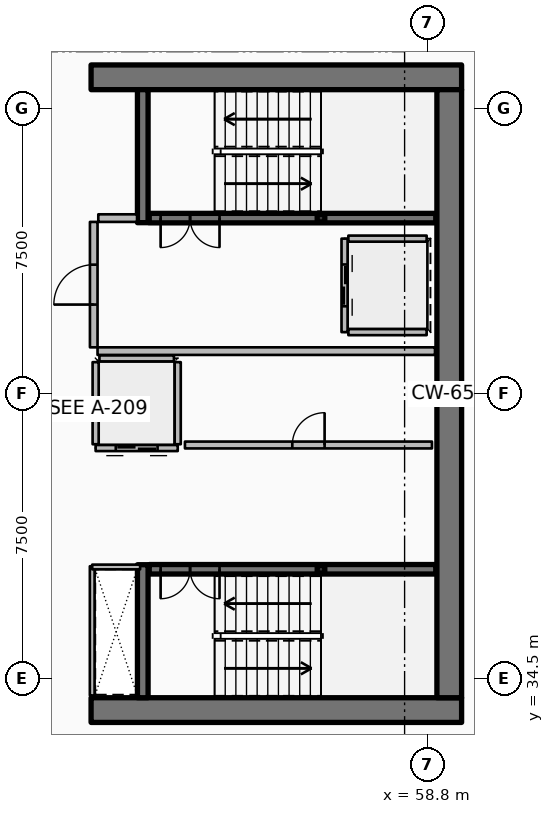
"""IFC4 building model, lengths in metres.
Left out: names, types, materials, properties, quantities, classifications, styles, units other than length and angle.
Written with IfcOpenShell. Run it as: python <this file> out.ifc"""

import sys

from ifc_helpers import new_model, si_unit, direction, frame, frame_2d, origin, origin_2d, place, context, subcontext, project, spatial, rectangle, hollow_rectangle, extrude, element, fill, save


model = new_model("IFC4")
c1 = context("Model", 3, precision=1e-05, world=origin(), true_north=direction((0.0, 1.0)))
c2 = subcontext(c1, "Body", "Model", "MODEL_VIEW")
j1 = project(units=[si_unit("LENGTHUNIT", "METRE"), si_unit("PLANEANGLEUNIT", "RADIAN")], contexts=[c1])
p1 = place(None, origin())
s1 = spatial("IfcSite", under=j1, at=p1, CompositionType="ELEMENT")
p2 = place(p1, origin())
s2 = spatial("IfcBuilding", under=s1, at=p2, CompositionType="ELEMENT")
p3 = place(p2, frame((0.0, 0.0, 217.8)))
s3 = spatial("IfcBuildingStorey", under=s2, at=p3, CompositionType="ELEMENT", Elevation=217.8)
for number, where, z_axis, x_axis in (
    (1, (49.95, 33.675, 0.0), (0.0, 0.0, 1.0), (1.0, 0.0, 0.0)),
    (2, (49.95, 50.325, 0.0), (0.0, 0.0, 1.0), (1.0, 0.0, 0.0)),
):
    element("IfcWall", number, at=place(p3, frame(where, z_axis=z_axis, x_axis=x_axis)), inside=s3, PredefinedType="SHEAR", context=c2, shape_type="SweptSolid", body=[
        extrude(rectangle(XDim=9.75, YDim=0.65, at=frame_2d((4.875, 0.0))), origin(), (0.0, 0.0, 1.0), 3.75),
    ])
p4 = place(p3, frame((59.375, 34.0, 0.0), z_axis=(0.0, 0.0, 1.0), x_axis=(0.0, 1.0, 0.0)))
e3 = element("IfcWall", 3, at=p4, inside=s3, PredefinedType="SHEAR", context=c2, shape_type="SweptSolid", body=[
    extrude(rectangle(XDim=16.0, YDim=0.65, at=frame_2d((8.0, 0.0))), origin(), (0.0, 0.0, 1.0), 3.75),
])
for number, where, z_axis, x_axis in (
    (4, (51.31, 46.5, 0.0), (0.0, 0.0, 1.0), (0.0, 1.0, 0.0)),
    (5, (51.31, 34.0, 0.0), (0.0, 0.0, 1.0), (0.0, 1.0, 0.0)),
):
    element("IfcWall", number, at=place(p3, frame(where, z_axis=z_axis, x_axis=x_axis)), inside=s3, PredefinedType="SHEAR", context=c2, shape_type="SweptSolid", body=[
        extrude(rectangle(XDim=3.5, YDim=0.28, at=frame_2d((1.75, 0.0))), origin(), (0.0, 0.0, 1.0), 3.75),
    ])
for number, where, z_axis, x_axis in (
    (6, (56.0, 46.62, 0.0), (0.0, 0.0, 1.0), (1.0, 0.0, 0.0)),
    (7, (56.0, 37.38, 0.0), (0.0, 0.0, 1.0), (1.0, 0.0, 0.0)),
):
    element("IfcColumn", number, at=place(p3, frame(where, z_axis=z_axis, x_axis=x_axis)), inside=s3, PredefinedType="COLUMN", context=c2, shape_type="SweptSolid", body=[
        extrude(hollow_rectangle(XDim=0.2, YDim=0.2, WallThickness=0.01, InnerFilletRadius=0.01, OuterFilletRadius=0.02, at=origin_2d()), origin(), (0.0, 0.0, 1.0), 1.67),
    ])
p5 = place(p3, frame((51.48, 46.62, 0.0), z_axis=(0.0, 0.0, 1.0), x_axis=(1.0, 0.0, 0.0)))
e8 = element("IfcWall", 8, at=p5, inside=s3, PredefinedType="SOLIDWALL", context=c2, shape_type="SweptSolid", body=[
    extrude(rectangle(XDim=7.54, YDim=0.25, at=frame_2d((3.77, 0.0))), origin(), (0.0, 0.0, 1.0), 3.5),
])
p6 = place(p5, frame((0.3, 0.0, 0.0)))
e9 = element("IfcOpeningElement", 9, at=p6, cuts=e8, PredefinedType="OPENING", context=c2, shape_type="SweptSolid", body=[
    extrude(rectangle(XDim=1.55, YDim=2.15, at=frame_2d((0.775, 1.075))), frame((0.0, 0.135, 0.0), z_axis=(0.0, -1.0, 0.0), x_axis=(1.0, 0.0, 0.0)), (0.0, 0.0, 1.0), 0.27),
])
p7 = place(p3, frame((51.48, 37.38, 0.0), z_axis=(0.0, 0.0, 1.0), x_axis=(1.0, 0.0, 0.0)))
e10 = element("IfcWall", 10, at=p7, inside=s3, PredefinedType="SOLIDWALL", context=c2, shape_type="SweptSolid", body=[
    extrude(rectangle(XDim=7.54, YDim=0.25, at=frame_2d((3.77, 0.0))), origin(), (0.0, 0.0, 1.0), 3.5),
])
p8 = place(p7, frame((0.3, 0.0, 0.0)))
e11 = element("IfcOpeningElement", 11, at=p8, cuts=e10, PredefinedType="OPENING", context=c2, shape_type="SweptSolid", body=[
    extrude(rectangle(XDim=1.55, YDim=2.15, at=frame_2d((0.775, 1.075))), frame((0.0, 0.135, 0.0), z_axis=(0.0, -1.0, 0.0), x_axis=(1.0, 0.0, 0.0)), (0.0, 0.0, 1.0), 0.27),
])
p9 = place(p3, frame((56.62, 46.08, 0.0), z_axis=(0.0, 0.0, 1.0), x_axis=(0.0, -1.0, 0.0)))
e12 = element("IfcWall", 12, at=p9, inside=s3, PredefinedType="PARTITIONING", context=c2, shape_type="SweptSolid", body=[
    extrude(rectangle(XDim=2.46, YDim=0.16, at=frame_2d((1.23, 0.0))), origin(), (0.0, 0.0, 1.0), 3.5),
])
p10 = place(p9, frame((0.68, 0.0, 0.0)))
e13 = element("IfcOpeningElement", 13, at=p10, cuts=e12, PredefinedType="OPENING", context=c2, shape_type="SweptSolid", body=[
    extrude(rectangle(XDim=1.1, YDim=2.1, at=frame_2d((0.55, 1.05))), frame((0.0, 0.09, 0.0), z_axis=(0.0, -1.0, 0.0), x_axis=(1.0, 0.0, 0.0)), (0.0, 0.0, 1.0), 0.18),
])
for number, where, z_axis, x_axis in (
    (14, (56.72, 46.08, 0.0), (0.0, 0.0, 1.0), (1.0, 0.0, 0.0)),
    (15, (56.72, 43.62, 0.0), (0.0, 0.0, 1.0), (1.0, 0.0, 0.0)),
):
    element("IfcWall", number, at=place(p3, frame(where, z_axis=z_axis, x_axis=x_axis)), inside=s3, PredefinedType="PARTITIONING", context=c2, shape_type="SweptSolid", body=[
        extrude(rectangle(XDim=2.06, YDim=0.16, at=frame_2d((1.03, 0.0))), origin(), (0.0, 0.0, 1.0), 3.5),
    ])
p11 = place(p3, frame((52.23, 40.57, 0.0), z_axis=(0.0, 0.0, 1.0), x_axis=(-1.0, 0.0, 0.0)))
e16 = element("IfcWall", 16, at=p11, inside=s3, PredefinedType="PARTITIONING", context=c2, shape_type="SweptSolid", body=[
    extrude(rectangle(XDim=2.16, YDim=0.16, at=frame_2d((1.08, 0.0))), origin(), (0.0, 0.0, 1.0), 3.5),
])
p12 = place(p11, frame((0.53, 0.0, 0.0)))
e17 = element("IfcOpeningElement", 17, at=p12, cuts=e16, PredefinedType="OPENING", context=c2, shape_type="SweptSolid", body=[
    extrude(rectangle(XDim=1.1, YDim=2.1, at=frame_2d((0.55, 1.05))), frame((0.0, 0.09, 0.0), z_axis=(0.0, -1.0, 0.0), x_axis=(1.0, 0.0, 0.0)), (0.0, 0.0, 1.0), 0.18),
])
for number, where, z_axis, x_axis in (
    (18, (52.23, 40.67, 0.0), (0.0, 0.0, 1.0), (0.0, 1.0, 0.0)),
    (19, (50.07, 40.67, 0.0), (0.0, 0.0, 1.0), (0.0, 1.0, 0.0)),
):
    element("IfcWall", number, at=place(p3, frame(where, z_axis=z_axis, x_axis=x_axis)), inside=s3, PredefinedType="PARTITIONING", context=c2, shape_type="SweptSolid", body=[
        extrude(rectangle(XDim=2.16, YDim=0.16, at=frame_2d((1.08, 0.0))), origin(), (0.0, 0.0, 1.0), 3.5),
    ])
p13 = place(p3, frame((50.17, 42.93, 0.0), z_axis=(0.0, 0.0, 1.0), x_axis=(1.0, 0.0, 0.0)))
e20 = element("IfcWall", 20, at=p13, inside=s3, PredefinedType="PARTITIONING", context=c2, shape_type="SweptSolid", body=[
    extrude(rectangle(XDim=1.96, YDim=0.16, at=frame_2d((0.98, 0.0))), origin(), (0.0, 0.0, 1.0), 3.5),
])
p14 = place(p3, frame((52.42, 40.65, 0.0), z_axis=(0.0, 0.0, 1.0), x_axis=(1.0, 0.0, 0.0)))
e21 = element("IfcWall", 21, at=p14, inside=s3, PredefinedType="PARTITIONING", context=c2, shape_type="SweptSolid", body=[
    extrude(rectangle(XDim=6.5, YDim=0.18, at=frame_2d((3.25, 0.0))), origin(), (0.0, 0.0, 1.0), 3.5),
])
p15 = place(p14, frame((2.825, 0.0, 0.0)))
e22 = element("IfcOpeningElement", 22, at=p15, cuts=e21, PredefinedType="OPENING", context=c2, shape_type="SweptSolid", body=[
    extrude(rectangle(XDim=0.85, YDim=2.06, at=frame_2d((0.425, 1.03))), frame((0.0, 0.1, 0.0), z_axis=(0.0, -1.0, 0.0), x_axis=(1.0, 0.0, 0.0)), (0.0, 0.0, 1.0), 0.2),
])
p16 = place(p3, frame((50.12, 43.12, 0.0), z_axis=(0.0, 0.0, 1.0), x_axis=(1.0, 0.0, 0.0)))
e23 = element("IfcWall", 23, at=p16, inside=s3, PredefinedType="PARTITIONING", context=c2, shape_type="SweptSolid", body=[
    extrude(rectangle(XDim=8.88, YDim=0.2, at=frame_2d((4.44, 0.0))), origin(), (0.0, 0.0, 1.0), 3.5),
])
p17 = place(p3, frame((50.14, 46.62, 0.0), z_axis=(0.0, 0.0, 1.0), x_axis=(1.0, 0.0, 0.0)))
e24 = element("IfcWall", 24, at=p17, inside=s3, PredefinedType="PARTITIONING", context=c2, shape_type="SweptSolid", body=[
    extrude(rectangle(XDim=1.02, YDim=0.2, at=frame_2d((0.51, 0.0))), origin(), (0.0, 0.0, 1.0), 3.5),
])
p18 = place(p3, frame((50.02, 43.22, 0.0), z_axis=(0.0, 0.0, 1.0), x_axis=(0.0, 1.0, 0.0)))
e25 = element("IfcWall", 25, at=p18, inside=s3, PredefinedType="PARTITIONING", context=c2, shape_type="SweptSolid", body=[
    extrude(rectangle(XDim=3.3, YDim=0.2, at=frame_2d((1.65, 0.0))), origin(), (0.0, 0.0, 1.0), 3.5),
])
p19 = place(p18, frame((1.125, 0.0, 0.0)))
e26 = element("IfcOpeningElement", 26, at=p19, cuts=e25, PredefinedType="OPENING", context=c2, shape_type="SweptSolid", body=[
    extrude(rectangle(XDim=1.05, YDim=2.1, at=frame_2d((0.525, 1.05))), frame((0.0, 0.11, 0.0), z_axis=(0.0, -1.0, 0.0), x_axis=(1.0, 0.0, 0.0)), (0.0, 0.0, 1.0), 0.22),
])
p20 = place(p3, frame((49.98, 34.06, 0.0), z_axis=(0.0, 0.0, 1.0), x_axis=(0.0, 1.0, 0.0)))
e27 = element("IfcWall", 27, at=p20, inside=s3, PredefinedType="PARTITIONING", context=c2, shape_type="SweptSolid", body=[
    extrude(rectangle(XDim=3.4, YDim=0.125, at=frame_2d((1.7, 0.0))), origin(), (0.0, 0.0, 1.0), 2.94),
])
p21 = place(p3, frame((49.98, 37.44, 0.0), z_axis=(0.0, 0.0, 1.0), x_axis=(1.0, 0.0, 0.0)))
e28 = element("IfcWall", 28, at=p21, inside=s3, PredefinedType="PARTITIONING", context=c2, shape_type="SweptSolid", body=[
    extrude(rectangle(XDim=1.26, YDim=0.125, at=frame_2d((0.63, 0.0))), origin(), (0.0, 0.0, 1.0), 2.94),
])
p22 = place(p6, origin())
e29 = element("IfcDoor", 29, at=p22, inside=s3, OperationType="DOUBLE_DOOR_SINGLE_SWING", PredefinedType="DOOR", context=c2, shape_type="SweptSolid", body=[
    extrude(rectangle(XDim=1.55, YDim=2.15, at=frame_2d((0.775, 1.075))), frame((0.0, 0.025, 0.0), z_axis=(0.0, -1.0, 0.0), x_axis=(1.0, 0.0, 0.0)), (0.0, 0.0, 1.0), 0.05),
])
fill(e9, e29)
p23 = place(p8, origin())
e30 = element("IfcDoor", 30, at=p23, inside=s3, OperationType="DOUBLE_DOOR_SINGLE_SWING", PredefinedType="DOOR", context=c2, shape_type="SweptSolid", body=[
    extrude(rectangle(XDim=1.55, YDim=2.15, at=frame_2d((0.775, 1.075))), frame((0.0, 0.025, 0.0), z_axis=(0.0, -1.0, 0.0), x_axis=(1.0, 0.0, 0.0)), (0.0, 0.0, 1.0), 0.05),
])
fill(e11, e30)
p24 = place(p10, origin())
e31 = element("IfcDoor", 31, at=p24, inside=s3, OperationType="DOUBLE_DOOR_SLIDING", PredefinedType="DOOR", context=c2, shape_type="SweptSolid", body=[
    extrude(rectangle(XDim=1.1, YDim=2.1, at=frame_2d((0.55, 1.05))), frame((0.0, 0.025, 0.0), z_axis=(0.0, -1.0, 0.0), x_axis=(1.0, 0.0, 0.0)), (0.0, 0.0, 1.0), 0.05),
])
fill(e13, e31)
p25 = place(p12, origin())
e32 = element("IfcDoor", 32, at=p25, inside=s3, OperationType="DOUBLE_DOOR_SLIDING", PredefinedType="DOOR", context=c2, shape_type="SweptSolid", body=[
    extrude(rectangle(XDim=1.1, YDim=2.1, at=frame_2d((0.55, 1.05))), frame((0.0, 0.025, 0.0), z_axis=(0.0, -1.0, 0.0), x_axis=(1.0, 0.0, 0.0)), (0.0, 0.0, 1.0), 0.05),
])
fill(e17, e32)
p26 = place(p15, origin())
e33 = element("IfcDoor", 33, at=p26, inside=s3, OperationType="SINGLE_SWING_RIGHT", PredefinedType="DOOR", context=c2, shape_type="SweptSolid", body=[
    extrude(rectangle(XDim=0.85, YDim=2.06, at=frame_2d((0.425, 1.03))), frame((0.0, 0.025, 0.0), z_axis=(0.0, -1.0, 0.0), x_axis=(1.0, 0.0, 0.0)), (0.0, 0.0, 1.0), 0.05),
])
fill(e22, e33)
p27 = place(p19, origin())
e34 = element("IfcDoor", 34, at=p27, inside=s3, OperationType="SINGLE_SWING_LEFT", PredefinedType="DOOR", context=c2, shape_type="SweptSolid", body=[
    extrude(rectangle(XDim=1.05, YDim=2.1, at=frame_2d((0.525, 1.05))), frame((0.0, 0.025, 0.0), z_axis=(0.0, -1.0, 0.0), x_axis=(1.0, 0.0, 0.0)), (0.0, 0.0, 1.0), 0.05),
])
fill(e26, e34)
save(model, sys.argv[1])
